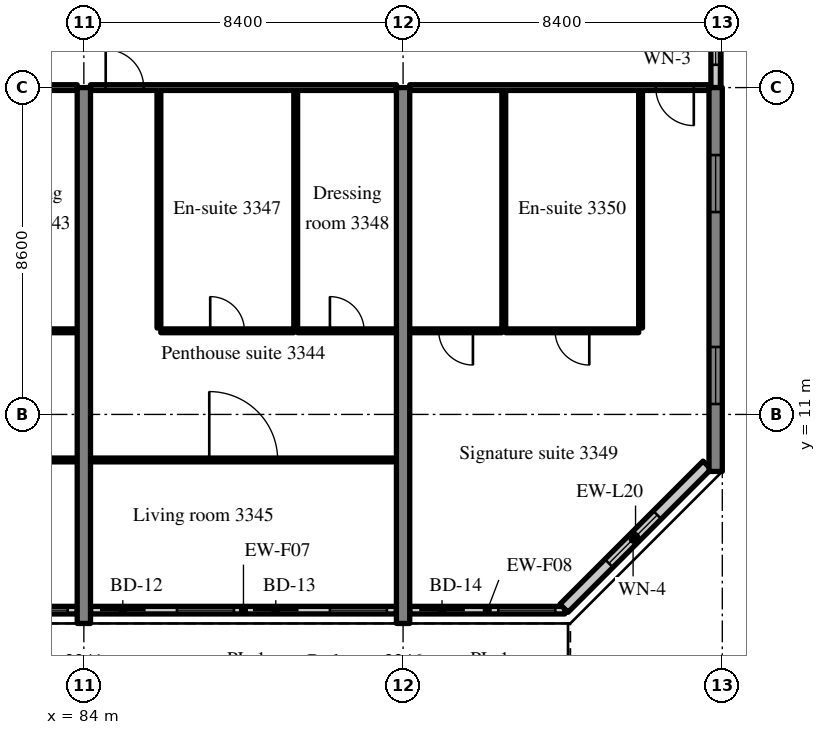
"""IFC4 building model, lengths in metres.
Left out: names, types, materials, properties, quantities, classifications, styles, units other than length and angle.
Written with IfcOpenShell. Run it as: python <this file> out.ifc"""

import sys

from ifc_helpers import new_model, si_unit, direction, frame, frame_2d, origin, place, context, subcontext, project, spatial, rectangle, extrude, source, transform, mapped, element, fill, save


model = new_model("IFC4")
c1 = context("Model", 3, precision=1e-05, world=origin(), true_north=direction((0.0, 1.0)))
c2 = subcontext(c1, "Body", "Model", "MODEL_VIEW")
j1 = project(units=[si_unit("LENGTHUNIT", "METRE"), si_unit("PLANEANGLEUNIT", "RADIAN")], contexts=[c1])
p1 = place(None, origin())
s1 = spatial("IfcSite", under=j1, at=p1, CompositionType="ELEMENT")
p2 = place(p1, origin())
s2 = spatial("IfcBuilding", under=s1, at=p2, CompositionType="ELEMENT")
p3 = place(p2, frame((0.0, 0.0, 137.0)))
s3 = spatial("IfcBuildingStorey", under=s2, at=p3, CompositionType="ELEMENT", Elevation=137.0)
m1 = source(origin(), c2, "Body", "SweptSolid", [
    extrude(rectangle(XDim=14.1, YDim=0.35, at=frame_2d((7.05, 0.0))), origin(), (0.0, 0.0, 1.0), 3.52),
])
for number, where, z_axis, x_axis in (
    (1, (84.0, 5.5, 0.0), (0.0, 0.0, 1.0), (0.0, 1.0, 0.0)),
    (2, (92.4, 5.5, 0.0), (0.0, 0.0, 1.0), (0.0, 1.0, 0.0)),
):
    element("IfcWall", number, at=place(p3, frame(where, z_axis=z_axis, x_axis=x_axis)), inside=s3, PredefinedType="SHEAR", context=c2, shape_type="MappedRepresentation", body=[
        mapped(m1, transform((0.0, 0.0, 0.0), scale=1.0)),
    ])
m2 = source(origin(), c2, "Body", "SweptSolid", [
    extrude(rectangle(XDim=10.1, YDim=0.35, at=frame_2d((5.05, 0.0))), origin(), (0.0, 0.0, 1.0), 3.52),
])
p4 = place(p3, frame((100.625, 9.5, 0.0), z_axis=(0.0, 0.0, 1.0), x_axis=(0.0, 1.0, 0.0)))
e3 = element("IfcWall", 3, at=p4, inside=s3, PredefinedType="SHEAR", context=c2, shape_type="MappedRepresentation", body=[
    mapped(m2, transform((0.0, 0.0, 0.0), scale=1.0)),
])
m3 = source(origin(), c2, "Body", "SweptSolid", [
    extrude(rectangle(XDim=1.5, YDim=1.5, at=frame_2d((0.75, 0.75))), frame((0.0, 0.185, 0.0), z_axis=(0.0, -1.0, 0.0), x_axis=(1.0, 0.0, 0.0)), (0.0, 0.0, 1.0), 0.37),
])
p5 = place(p4, frame((1.775, 0.0, 0.9)))
e4 = element("IfcOpeningElement", 4, at=p5, cuts=e3, PredefinedType="OPENING", context=c2, shape_type="MappedRepresentation", body=[
    mapped(m3, transform((0.0, 0.0, 0.0), scale=1.0)),
])
p6 = place(p4, frame((6.825, 0.0, 0.9)))
e5 = element("IfcOpeningElement", 5, at=p6, cuts=e3, PredefinedType="OPENING", context=c2, shape_type="MappedRepresentation", body=[
    mapped(m3, transform((0.0, 0.0, 0.0), scale=1.0)),
])
m4 = source(origin(), c2, "Body", "SweptSolid", [
    extrude(rectangle(XDim=8.05, YDim=0.2, at=frame_2d((4.025, 0.0))), origin(), (0.0, 0.0, 1.0), 2.82),
])
p7 = place(p3, frame((75.775, 5.85, 0.0), z_axis=(0.0, 0.0, 1.0), x_axis=(1.0, 0.0, 0.0)))
e6 = element("IfcWall", 6, at=p7, inside=s3, PredefinedType="SOLIDWALL", context=c2, shape_type="MappedRepresentation", body=[
    mapped(m4, transform((0.0, 0.0, 0.0), scale=1.0)),
])
m5 = source(origin(), c2, "Body", "SweptSolid", [
    extrude(rectangle(XDim=1.2, YDim=2.4, at=frame_2d((0.6, 1.2))), frame((0.0, 0.11, 0.0), z_axis=(0.0, -1.0, 0.0), x_axis=(1.0, 0.0, 0.0)), (0.0, 0.0, 1.0), 0.22),
])
p8 = place(p7, frame((0.25, 0.0, 0.0)))
e7 = element("IfcOpeningElement", 7, at=p8, cuts=e6, PredefinedType="OPENING", context=c2, shape_type="MappedRepresentation", body=[
    mapped(m5, transform((0.0, 0.0, 0.0), scale=1.0)),
])
m6 = source(origin(), c2, "Body", "SweptSolid", [
    extrude(rectangle(XDim=1.5, YDim=1.5, at=frame_2d((0.75, 0.75))), frame((0.0, 0.11, 0.0), z_axis=(0.0, -1.0, 0.0), x_axis=(1.0, 0.0, 0.0)), (0.0, 0.0, 1.0), 0.22),
])
p9 = place(p7, frame((2.275, 0.0, 0.9)))
e8 = element("IfcOpeningElement", 8, at=p9, cuts=e6, PredefinedType="OPENING", context=c2, shape_type="MappedRepresentation", body=[
    mapped(m6, transform((0.0, 0.0, 0.0), scale=1.0)),
])
p10 = place(p7, frame((4.275, 0.0, 0.0)))
e9 = element("IfcOpeningElement", 9, at=p10, cuts=e6, PredefinedType="OPENING", context=c2, shape_type="MappedRepresentation", body=[
    mapped(m5, transform((0.0, 0.0, 0.0), scale=1.0)),
])
p11 = place(p7, frame((6.3, 0.0, 0.9)))
e10 = element("IfcOpeningElement", 10, at=p11, cuts=e6, PredefinedType="OPENING", context=c2, shape_type="MappedRepresentation", body=[
    mapped(m6, transform((0.0, 0.0, 0.0), scale=1.0)),
])
p12 = place(p3, frame((84.175, 5.85, 0.0), z_axis=(0.0, 0.0, 1.0), x_axis=(1.0, 0.0, 0.0)))
e11 = element("IfcWall", 11, at=p12, inside=s3, PredefinedType="SOLIDWALL", context=c2, shape_type="MappedRepresentation", body=[
    mapped(m4, transform((0.0, 0.0, 0.0), scale=1.0)),
])
p13 = place(p12, frame((0.25, 0.0, 0.0)))
e12 = element("IfcOpeningElement", 12, at=p13, cuts=e11, PredefinedType="OPENING", context=c2, shape_type="MappedRepresentation", body=[
    mapped(m5, transform((0.0, 0.0, 0.0), scale=1.0)),
])
p14 = place(p12, frame((2.275, 0.0, 0.9)))
e13 = element("IfcOpeningElement", 13, at=p14, cuts=e11, PredefinedType="OPENING", context=c2, shape_type="MappedRepresentation", body=[
    mapped(m6, transform((0.0, 0.0, 0.0), scale=1.0)),
])
p15 = place(p12, frame((4.275, 0.0, 0.0)))
e14 = element("IfcOpeningElement", 14, at=p15, cuts=e11, PredefinedType="OPENING", context=c2, shape_type="MappedRepresentation", body=[
    mapped(m5, transform((0.0, 0.0, 0.0), scale=1.0)),
])
p16 = place(p12, frame((6.3, 0.0, 0.9)))
e15 = element("IfcOpeningElement", 15, at=p16, cuts=e11, PredefinedType="OPENING", context=c2, shape_type="MappedRepresentation", body=[
    mapped(m6, transform((0.0, 0.0, 0.0), scale=1.0)),
])
m7 = source(origin(), c2, "Body", "SweptSolid", [
    extrude(rectangle(XDim=4.08, YDim=0.2, at=frame_2d((2.04, 0.0))), origin(), (0.0, 0.0, 1.0), 2.82),
])
p17 = place(p3, frame((92.575, 5.85, 0.0), z_axis=(0.0, 0.0, 1.0), x_axis=(1.0, 0.0, 0.0)))
e16 = element("IfcWall", 16, at=p17, inside=s3, PredefinedType="SOLIDWALL", context=c2, shape_type="MappedRepresentation", body=[
    mapped(m7, transform((0.0, 0.0, 0.0), scale=1.0)),
])
p18 = place(p17, frame((0.25, 0.0, 0.0)))
e17 = element("IfcOpeningElement", 17, at=p18, cuts=e16, PredefinedType="OPENING", context=c2, shape_type="MappedRepresentation", body=[
    mapped(m5, transform((0.0, 0.0, 0.0), scale=1.0)),
])
p19 = place(p17, frame((2.33, 0.0, 0.9)))
e18 = element("IfcOpeningElement", 18, at=p19, cuts=e16, PredefinedType="OPENING", context=c2, shape_type="MappedRepresentation", body=[
    mapped(m6, transform((0.0, 0.0, 0.0), scale=1.0)),
])
m8 = source(origin(), c2, "Body", "SweptSolid", [
    extrude(rectangle(XDim=5.326, YDim=0.3, at=frame_2d((2.663, 0.0))), origin(), (0.0, 0.0, 1.0), 3.52),
])
p20 = place(p3, frame((96.634, 5.9, 0.0), z_axis=(0.0, 0.0, 1.0), x_axis=(0.707083859269, 0.707129702361, 0.0)))
e19 = element("IfcWall", 19, at=p20, inside=s3, PredefinedType="SOLIDWALL", context=c2, shape_type="MappedRepresentation", body=[
    mapped(m8, transform((0.0, 0.0, 0.0), scale=1.0)),
])
m9 = source(origin(), c2, "Body", "SweptSolid", [
    extrude(rectangle(XDim=1.8, YDim=1.5, at=frame_2d((0.9, 0.75))), frame((0.0, 0.16, 0.0), z_axis=(0.0, -1.0, 0.0), x_axis=(1.0, 0.0, 0.0)), (0.0, 0.0, 1.0), 0.32),
])
p21 = place(p20, frame((1.672, 0.0, 0.9)))
e20 = element("IfcOpeningElement", 20, at=p21, cuts=e19, PredefinedType="OPENING", context=c2, shape_type="MappedRepresentation", body=[
    mapped(m9, transform((0.0, 0.0, 0.0), scale=1.0)),
])
m10 = source(origin(), c2, "Body", "SweptSolid", [
    extrude(rectangle(XDim=2.4, YDim=0.25, at=frame_2d((1.2, 0.0))), origin(), (0.0, 0.0, 1.0), 2.62),
])
p22 = place(p3, frame((100.625, 19.6, 0.0), z_axis=(0.0, 0.0, 1.0), x_axis=(0.0, 1.0, 0.0)))
e21 = element("IfcWall", 21, at=p22, inside=s3, PredefinedType="SOLIDWALL", context=c2, shape_type="MappedRepresentation", body=[
    mapped(m10, transform((0.0, 0.0, 0.0), scale=1.0)),
])
m11 = source(origin(), c2, "Body", "SweptSolid", [
    extrude(rectangle(XDim=1.2, YDim=1.5, at=frame_2d((0.6, 0.75))), frame((0.0, 0.135, 0.0), z_axis=(0.0, -1.0, 0.0), x_axis=(1.0, 0.0, 0.0)), (0.0, 0.0, 1.0), 0.27),
])
p23 = place(p22, frame((0.6, 0.0, 0.9)))
e22 = element("IfcOpeningElement", 22, at=p23, cuts=e21, PredefinedType="OPENING", context=c2, shape_type="MappedRepresentation", body=[
    mapped(m11, transform((0.0, 0.0, 0.0), scale=1.0)),
])
m12 = source(origin(), c2, "Body", "SweptSolid", [
    extrude(rectangle(XDim=2.6, YDim=0.1, at=frame_2d((1.3, 0.0))), origin(), (0.0, 0.0, 1.0), 3.52),
])
p24 = place(p3, frame((81.225, 13.2, 0.0), z_axis=(0.0, 0.0, 1.0), x_axis=(1.0, 0.0, 0.0)))
e23 = element("IfcWall", 23, at=p24, inside=s3, PredefinedType="PARTITIONING", context=c2, shape_type="MappedRepresentation", body=[
    mapped(m12, transform((0.0, 0.0, 0.0), scale=1.0)),
])
m13 = source(origin(), c2, "Body", "SweptSolid", [
    extrude(rectangle(XDim=0.9, YDim=2.1, at=frame_2d((0.45, 1.05))), frame((0.0, 0.06, 0.0), z_axis=(0.0, -1.0, 0.0), x_axis=(1.0, 0.0, 0.0)), (0.0, 0.0, 1.0), 0.12),
])
p25 = place(p24, frame((0.85, 0.0, 0.0)))
e24 = element("IfcOpeningElement", 24, at=p25, cuts=e23, PredefinedType="OPENING", context=c2, shape_type="MappedRepresentation", body=[
    mapped(m13, transform((0.0, 0.0, 0.0), scale=1.0)),
])
m14 = source(origin(), c2, "Body", "SweptSolid", [
    extrude(rectangle(XDim=8.05, YDim=0.1, at=frame_2d((4.025, 0.0))), origin(), (0.0, 0.0, 1.0), 3.52),
])
p26 = place(p3, frame((75.775, 9.802, 0.0), z_axis=(0.0, 0.0, 1.0), x_axis=(1.0, 0.0, 0.0)))
e25 = element("IfcWall", 25, at=p26, inside=s3, PredefinedType="PARTITIONING", context=c2, shape_type="MappedRepresentation", body=[
    mapped(m14, transform((0.0, 0.0, 0.0), scale=1.0)),
])
m15 = source(origin(), c2, "Body", "SweptSolid", [
    extrude(rectangle(XDim=1.8, YDim=2.1, at=frame_2d((0.9, 1.05))), frame((0.0, 0.06, 0.0), z_axis=(0.0, -1.0, 0.0), x_axis=(1.0, 0.0, 0.0)), (0.0, 0.0, 1.0), 0.12),
])
p27 = place(p26, frame((3.125, 0.0, 0.0)))
e26 = element("IfcOpeningElement", 26, at=p27, cuts=e25, PredefinedType="OPENING", context=c2, shape_type="MappedRepresentation", body=[
    mapped(m15, transform((0.0, 0.0, 0.0), scale=1.0)),
])
m16 = source(origin(), c2, "Body", "SweptSolid", [
    extrude(rectangle(XDim=8.05, YDim=0.15, at=frame_2d((4.025, 0.0))), origin(), (0.0, 0.0, 1.0), 2.82),
])
p28 = place(p3, frame((75.775, 19.6, 0.0), z_axis=(0.0, 0.0, 1.0), x_axis=(1.0, 0.0, 0.0)))
e27 = element("IfcWall", 27, at=p28, inside=s3, PredefinedType="PARTITIONING", context=c2, shape_type="MappedRepresentation", body=[
    mapped(m16, transform((0.0, 0.0, 0.0), scale=1.0)),
])
m17 = source(origin(), c2, "Body", "SweptSolid", [
    extrude(rectangle(XDim=1.0, YDim=2.1, at=frame_2d((0.5, 1.05))), frame((0.0, 0.085, 0.0), z_axis=(0.0, -1.0, 0.0), x_axis=(1.0, 0.0, 0.0)), (0.0, 0.0, 1.0), 0.17),
])
p29 = place(p28, frame((0.4, 0.0, 0.0)))
e28 = element("IfcOpeningElement", 28, at=p29, cuts=e27, PredefinedType="OPENING", context=c2, shape_type="MappedRepresentation", body=[
    mapped(m17, transform((0.0, 0.0, 0.0), scale=1.0)),
])
m18 = source(origin(), c2, "Body", "SweptSolid", [
    extrude(rectangle(XDim=6.25, YDim=0.1, at=frame_2d((3.125, 0.0))), origin(), (0.0, 0.0, 1.0), 3.52),
])
for number, where, z_axis, x_axis in (
    (29, (85.975, 13.275, 0.0), (0.0, 0.0, 1.0), (0.0, 1.0, 0.0)),
    (30, (89.575, 13.275, 0.0), (0.0, 0.0, 1.0), (0.0, 1.0, 0.0)),
):
    element("IfcWall", number, at=place(p3, frame(where, z_axis=z_axis, x_axis=x_axis)), inside=s3, PredefinedType="PARTITIONING", context=c2, shape_type="MappedRepresentation", body=[
        mapped(m18, transform((0.0, 0.0, 0.0), scale=1.0)),
    ])
m19 = source(origin(), c2, "Body", "SweptSolid", [
    extrude(rectangle(XDim=3.5, YDim=0.1, at=frame_2d((1.75, 0.0))), origin(), (0.0, 0.0, 1.0), 3.52),
])
p30 = place(p3, frame((86.025, 13.2, 0.0), z_axis=(0.0, 0.0, 1.0), x_axis=(1.0, 0.0, 0.0)))
e31 = element("IfcWall", 31, at=p30, inside=s3, PredefinedType="PARTITIONING", context=c2, shape_type="MappedRepresentation", body=[
    mapped(m19, transform((0.0, 0.0, 0.0), scale=1.0)),
])
p31 = place(p30, frame((1.3, 0.0, 0.0)))
e32 = element("IfcOpeningElement", 32, at=p31, cuts=e31, PredefinedType="OPENING", context=c2, shape_type="MappedRepresentation", body=[
    mapped(m13, transform((0.0, 0.0, 0.0), scale=1.0)),
])
m20 = source(origin(), c2, "Body", "SweptSolid", [
    extrude(rectangle(XDim=2.6, YDim=0.1, at=frame_2d((1.3, 0.0))), origin(), (0.0, 0.0, 1.0), 3.52),
])
p32 = place(p3, frame((89.625, 13.2, 0.0), z_axis=(0.0, 0.0, 1.0), x_axis=(1.0, 0.0, 0.0)))
e33 = element("IfcWall", 33, at=p32, inside=s3, PredefinedType="PARTITIONING", context=c2, shape_type="MappedRepresentation", body=[
    mapped(m20, transform((0.0, 0.0, 0.0), scale=1.0)),
])
p33 = place(p32, frame((0.85, 0.0, 0.0)))
e34 = element("IfcOpeningElement", 34, at=p33, cuts=e33, PredefinedType="OPENING", context=c2, shape_type="MappedRepresentation", body=[
    mapped(m13, transform((0.0, 0.0, 0.0), scale=1.0)),
])
p34 = place(p3, frame((84.175, 9.802, 0.0), z_axis=(0.0, 0.0, 1.0), x_axis=(1.0, 0.0, 0.0)))
e35 = element("IfcWall", 35, at=p34, inside=s3, PredefinedType="PARTITIONING", context=c2, shape_type="MappedRepresentation", body=[
    mapped(m14, transform((0.0, 0.0, 0.0), scale=1.0)),
])
p35 = place(p34, frame((3.125, 0.0, 0.0)))
e36 = element("IfcOpeningElement", 36, at=p35, cuts=e35, PredefinedType="OPENING", context=c2, shape_type="MappedRepresentation", body=[
    mapped(m15, transform((0.0, 0.0, 0.0), scale=1.0)),
])
p36 = place(p3, frame((84.175, 19.6, 0.0), z_axis=(0.0, 0.0, 1.0), x_axis=(1.0, 0.0, 0.0)))
e37 = element("IfcWall", 37, at=p36, inside=s3, PredefinedType="PARTITIONING", context=c2, shape_type="MappedRepresentation", body=[
    mapped(m16, transform((0.0, 0.0, 0.0), scale=1.0)),
])
p37 = place(p36, frame((0.4, 0.0, 0.0)))
e38 = element("IfcOpeningElement", 38, at=p37, cuts=e37, PredefinedType="OPENING", context=c2, shape_type="MappedRepresentation", body=[
    mapped(m17, transform((0.0, 0.0, 0.0), scale=1.0)),
])
for number, where, z_axis, x_axis in (
    (39, (98.65, 13.275, 0.0), (0.0, 0.0, 1.0), (0.0, 1.0, 0.0)),
    (40, (95.05, 13.275, 0.0), (0.0, 0.0, 1.0), (0.0, 1.0, 0.0)),
):
    element("IfcWall", number, at=place(p3, frame(where, z_axis=z_axis, x_axis=x_axis)), inside=s3, PredefinedType="PARTITIONING", context=c2, shape_type="MappedRepresentation", body=[
        mapped(m18, transform((0.0, 0.0, 0.0), scale=1.0)),
    ])
p38 = place(p3, frame((95.1, 13.2, 0.0), z_axis=(0.0, 0.0, 1.0), x_axis=(1.0, 0.0, 0.0)))
e41 = element("IfcWall", 41, at=p38, inside=s3, PredefinedType="PARTITIONING", context=c2, shape_type="MappedRepresentation", body=[
    mapped(m19, transform((0.0, 0.0, 0.0), scale=1.0)),
])
p39 = place(p38, frame((1.3, 0.0, 0.0)))
e42 = element("IfcOpeningElement", 42, at=p39, cuts=e41, PredefinedType="OPENING", context=c2, shape_type="MappedRepresentation", body=[
    mapped(m13, transform((0.0, 0.0, 0.0), scale=1.0)),
])
m21 = source(origin(), c2, "Body", "SweptSolid", [
    extrude(rectangle(XDim=2.425, YDim=0.1, at=frame_2d((1.212, 0.0))), origin(), (0.0, 0.0, 1.0), 3.52),
])
p40 = place(p3, frame((92.575, 13.2, 0.0), z_axis=(0.0, 0.0, 1.0), x_axis=(1.0, 0.0, 0.0)))
e43 = element("IfcWall", 43, at=p40, inside=s3, PredefinedType="PARTITIONING", context=c2, shape_type="MappedRepresentation", body=[
    mapped(m21, transform((0.0, 0.0, 0.0), scale=1.0)),
])
p41 = place(p40, frame((0.763, 0.0, 0.0)))
e44 = element("IfcOpeningElement", 44, at=p41, cuts=e43, PredefinedType="OPENING", context=c2, shape_type="MappedRepresentation", body=[
    mapped(m13, transform((0.0, 0.0, 0.0), scale=1.0)),
])
m22 = source(origin(), c2, "Body", "SweptSolid", [
    extrude(rectangle(XDim=7.875, YDim=0.15, at=frame_2d((3.938, 0.0))), origin(), (0.0, 0.0, 1.0), 2.82),
])
p42 = place(p3, frame((92.575, 19.6, 0.0), z_axis=(0.0, 0.0, 1.0), x_axis=(1.0, 0.0, 0.0)))
e45 = element("IfcWall", 45, at=p42, inside=s3, PredefinedType="PARTITIONING", context=c2, shape_type="MappedRepresentation", body=[
    mapped(m22, transform((0.0, 0.0, 0.0), scale=1.0)),
])
p43 = place(p42, frame((6.475, 0.0, 0.0)))
e46 = element("IfcOpeningElement", 46, at=p43, cuts=e45, PredefinedType="OPENING", context=c2, shape_type="MappedRepresentation", body=[
    mapped(m17, transform((0.0, 0.0, 0.0), scale=1.0)),
])
m23 = source(origin(), c2, "Body", "SweptSolid", [
    extrude(rectangle(XDim=1.5, YDim=1.5, at=frame_2d((0.75, 0.75))), frame((0.0, 0.03, 0.0), z_axis=(0.0, -1.0, 0.0), x_axis=(1.0, 0.0, 0.0)), (0.0, 0.0, 1.0), 0.06),
])
p44 = place(p11, origin())
e47 = element("IfcWindow", 47, at=p44, inside=s3, PartitioningType="SINGLE_PANEL", PredefinedType="WINDOW", context=c2, shape_type="MappedRepresentation", body=[
    mapped(m23, transform((0.0, 0.0, 0.0), scale=1.0)),
])
fill(e10, e47)
m24 = source(origin(), c2, "Body", "SweptSolid", [
    extrude(rectangle(XDim=1.2, YDim=2.4, at=frame_2d((0.6, 1.2))), frame((0.0, 0.025, 0.0), z_axis=(0.0, -1.0, 0.0), x_axis=(1.0, 0.0, 0.0)), (0.0, 0.0, 1.0), 0.05),
])
p45 = place(p13, origin())
e48 = element("IfcDoor", 48, at=p45, inside=s3, OperationType="SLIDING_TO_RIGHT", PredefinedType="DOOR", context=c2, shape_type="MappedRepresentation", body=[
    mapped(m24, transform((0.0, 0.0, 0.0), scale=1.0)),
])
fill(e12, e48)
p46 = place(p14, origin())
e49 = element("IfcWindow", 49, at=p46, inside=s3, PartitioningType="SINGLE_PANEL", PredefinedType="WINDOW", context=c2, shape_type="MappedRepresentation", body=[
    mapped(m23, transform((0.0, 0.0, 0.0), scale=1.0)),
])
fill(e13, e49)
p47 = place(p15, origin())
e50 = element("IfcDoor", 50, at=p47, inside=s3, OperationType="SLIDING_TO_LEFT", PredefinedType="DOOR", context=c2, shape_type="MappedRepresentation", body=[
    mapped(m24, transform((0.0, 0.0, 0.0), scale=1.0)),
])
fill(e14, e50)
p48 = place(p16, origin())
e51 = element("IfcWindow", 51, at=p48, inside=s3, PartitioningType="SINGLE_PANEL", PredefinedType="WINDOW", context=c2, shape_type="MappedRepresentation", body=[
    mapped(m23, transform((0.0, 0.0, 0.0), scale=1.0)),
])
fill(e15, e51)
p49 = place(p18, origin())
e52 = element("IfcDoor", 52, at=p49, inside=s3, OperationType="SLIDING_TO_RIGHT", PredefinedType="DOOR", context=c2, shape_type="MappedRepresentation", body=[
    mapped(m24, transform((0.0, 0.0, 0.0), scale=1.0)),
])
fill(e17, e52)
p50 = place(p19, origin())
e53 = element("IfcWindow", 53, at=p50, inside=s3, PartitioningType="SINGLE_PANEL", PredefinedType="WINDOW", context=c2, shape_type="MappedRepresentation", body=[
    mapped(m23, transform((0.0, 0.0, 0.0), scale=1.0)),
])
fill(e18, e53)
m25 = source(origin(), c2, "Body", "SweptSolid", [
    extrude(rectangle(XDim=1.8, YDim=1.5, at=frame_2d((0.9, 0.75))), frame((0.0, 0.03, 0.0), z_axis=(0.0, -1.0, 0.0), x_axis=(1.0, 0.0, 0.0)), (0.0, 0.0, 1.0), 0.06),
])
p51 = place(p21, origin())
e54 = element("IfcWindow", 54, at=p51, inside=s3, PartitioningType="SINGLE_PANEL", PredefinedType="WINDOW", context=c2, shape_type="MappedRepresentation", body=[
    mapped(m25, transform((0.0, 0.0, 0.0), scale=1.0)),
])
fill(e20, e54)
p52 = place(p5, origin())
e55 = element("IfcWindow", 55, at=p52, inside=s3, PartitioningType="SINGLE_PANEL", PredefinedType="WINDOW", context=c2, shape_type="MappedRepresentation", body=[
    mapped(m23, transform((0.0, 0.0, 0.0), scale=1.0)),
])
fill(e4, e55)
p53 = place(p6, origin())
e56 = element("IfcWindow", 56, at=p53, inside=s3, PartitioningType="SINGLE_PANEL", PredefinedType="WINDOW", context=c2, shape_type="MappedRepresentation", body=[
    mapped(m23, transform((0.0, 0.0, 0.0), scale=1.0)),
])
fill(e5, e56)
m26 = source(origin(), c2, "Body", "SweptSolid", [
    extrude(rectangle(XDim=1.2, YDim=1.5, at=frame_2d((0.6, 0.75))), frame((0.0, 0.03, 0.0), z_axis=(0.0, -1.0, 0.0), x_axis=(1.0, 0.0, 0.0)), (0.0, 0.0, 1.0), 0.06),
])
p54 = place(p23, origin())
e57 = element("IfcWindow", 57, at=p54, inside=s3, PartitioningType="SINGLE_PANEL", PredefinedType="WINDOW", context=c2, shape_type="MappedRepresentation", body=[
    mapped(m26, transform((0.0, 0.0, 0.0), scale=1.0)),
])
fill(e22, e57)
m27 = source(origin(), c2, "Body", "SweptSolid", [
    extrude(rectangle(XDim=0.9, YDim=2.1, at=frame_2d((0.45, 1.05))), frame((0.0, 0.025, 0.0), z_axis=(0.0, -1.0, 0.0), x_axis=(1.0, 0.0, 0.0)), (0.0, 0.0, 1.0), 0.05),
])
p55 = place(p31, origin())
e58 = element("IfcDoor", 58, at=p55, inside=s3, OperationType="SINGLE_SWING_LEFT", PredefinedType="DOOR", context=c2, shape_type="MappedRepresentation", body=[
    mapped(m27, transform((0.0, 0.0, 0.0), scale=1.0)),
])
fill(e32, e58)
p56 = place(p33, origin())
e59 = element("IfcDoor", 59, at=p56, inside=s3, OperationType="SINGLE_SWING_LEFT", PredefinedType="DOOR", context=c2, shape_type="MappedRepresentation", body=[
    mapped(m27, transform((0.0, 0.0, 0.0), scale=1.0)),
])
fill(e34, e59)
m28 = source(origin(), c2, "Body", "SweptSolid", [
    extrude(rectangle(XDim=1.8, YDim=2.1, at=frame_2d((0.9, 1.05))), frame((0.0, 0.025, 0.0), z_axis=(0.0, -1.0, 0.0), x_axis=(1.0, 0.0, 0.0)), (0.0, 0.0, 1.0), 0.05),
])
p57 = place(p35, origin())
e60 = element("IfcDoor", 60, at=p57, inside=s3, OperationType="DOUBLE_DOOR_SINGLE_SWING", PredefinedType="DOOR", context=c2, shape_type="MappedRepresentation", body=[
    mapped(m28, transform((0.0, 0.0, 0.0), scale=1.0)),
])
fill(e36, e60)
m29 = source(origin(), c2, "Body", "SweptSolid", [
    extrude(rectangle(XDim=1.0, YDim=2.1, at=frame_2d((0.5, 1.05))), frame((0.0, 0.025, 0.0), z_axis=(0.0, -1.0, 0.0), x_axis=(1.0, 0.0, 0.0)), (0.0, 0.0, 1.0), 0.05),
])
p58 = place(p37, origin())
e61 = element("IfcDoor", 61, at=p58, inside=s3, OperationType="SINGLE_SWING_LEFT", PredefinedType="DOOR", context=c2, shape_type="MappedRepresentation", body=[
    mapped(m29, transform((0.0, 0.0, 0.0), scale=1.0)),
])
fill(e38, e61)
p59 = place(p39, origin())
e62 = element("IfcDoor", 62, at=p59, inside=s3, OperationType="SINGLE_SWING_RIGHT", PredefinedType="DOOR", context=c2, shape_type="MappedRepresentation", body=[
    mapped(m27, transform((0.0, 0.0, 0.0), scale=1.0)),
])
fill(e42, e62)
p60 = place(p41, origin())
e63 = element("IfcDoor", 63, at=p60, inside=s3, OperationType="SINGLE_SWING_RIGHT", PredefinedType="DOOR", context=c2, shape_type="MappedRepresentation", body=[
    mapped(m27, transform((0.0, 0.0, 0.0), scale=1.0)),
])
fill(e44, e63)
p61 = place(p43, origin())
e64 = element("IfcDoor", 64, at=p61, inside=s3, OperationType="SINGLE_SWING_RIGHT", PredefinedType="DOOR", context=c2, shape_type="MappedRepresentation", body=[
    mapped(m29, transform((0.0, 0.0, 0.0), scale=1.0)),
])
fill(e46, e64)
save(model, sys.argv[1])
